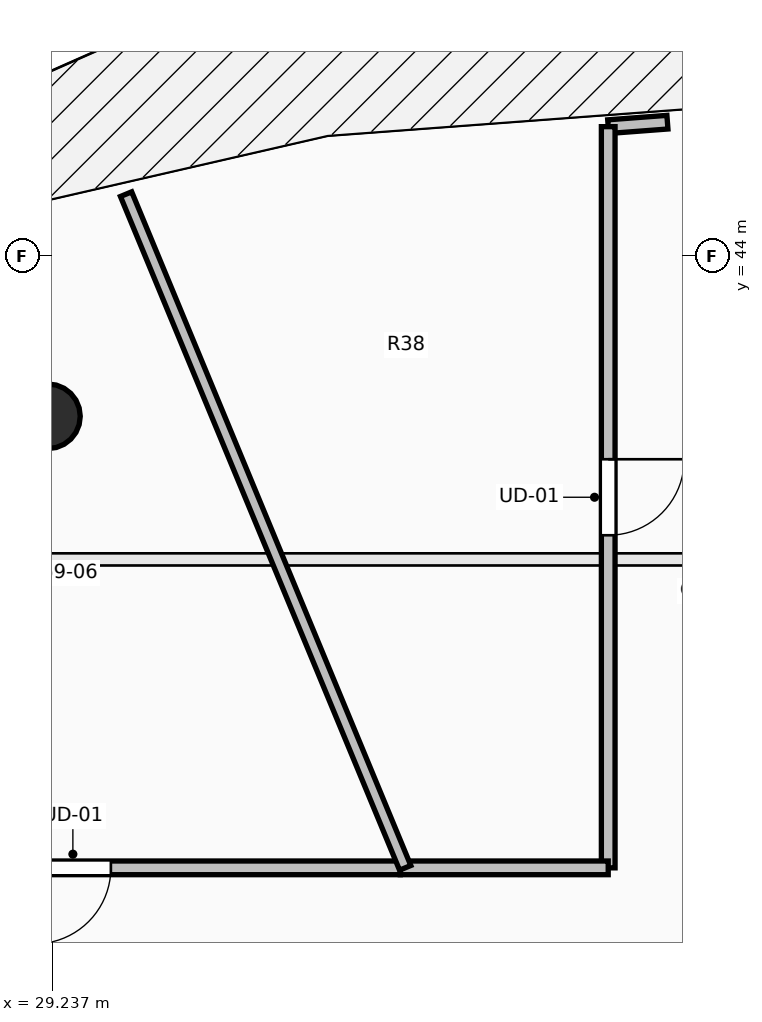
"""IFC4 building model, lengths in metres.
Left out: names, types, materials, properties, quantities, classifications, styles, units other than length and angle.
Written with IfcOpenShell. Run it as: python <this file> out.ifc"""

import sys

from ifc_helpers import new_model, si_unit, direction, frame, frame_2d, origin, origin_2d, place, context, subcontext, project, spatial, rectangle, circle, extrude, element, fill, save


model = new_model("IFC4")
c1 = context("Model", 3, precision=1e-05, world=origin(), true_north=direction((0.0, 1.0)))
c2 = subcontext(c1, "Body", "Model", "MODEL_VIEW")
j1 = project(units=[si_unit("LENGTHUNIT", "METRE"), si_unit("PLANEANGLEUNIT", "RADIAN")], contexts=[c1])
p1 = place(None, origin())
s1 = spatial("IfcSite", under=j1, at=p1, CompositionType="ELEMENT")
p2 = place(p1, origin())
s2 = spatial("IfcBuilding", under=s1, at=p2, CompositionType="ELEMENT")
p3 = place(p2, frame((0.0, 0.0, 255.55)))
s3 = spatial("IfcBuildingStorey", under=s2, at=p3, CompositionType="ELEMENT", Elevation=255.55)
p4 = place(p3, frame((29.179, 41.891, 0.0), z_axis=(0.0, 0.0, 1.0), x_axis=(-0.382683432365, 0.923879532511, 0.0)))
e1 = element("IfcColumn", 1, at=p4, inside=s3, PredefinedType="COLUMN", context=c2, shape_type="SweptSolid", body=[
    extrude(circle(Radius=0.425, at=origin_2d()), origin(), (0.0, 0.0, 1.0), 3.55),
])
p5 = place(p3, frame((37.329, 45.76, 0.0), z_axis=(0.0, 0.0, 1.0), x_axis=(-0.997136622012, -0.0756211415, 0.0)))
e2 = element("IfcWall", 2, at=p5, inside=s3, PredefinedType="PARTITIONING", context=c2, shape_type="SweptSolid", body=[
    extrude(rectangle(XDim=0.781, YDim=0.18, at=frame_2d((0.391, 0.0))), origin(), (0.0, 0.0, 1.0), 3.29),
])
p6 = place(p3, frame((36.55, 45.701, 0.0), z_axis=(0.0, 0.0, 1.0), x_axis=(0.0, -1.0, 0.0)))
e3 = element("IfcWall", 3, at=p6, inside=s3, PredefinedType="PARTITIONING", context=c2, shape_type="SweptSolid", body=[
    extrude(rectangle(XDim=9.751, YDim=0.18, at=frame_2d((4.875, 0.0))), origin(), (0.0, 0.0, 1.0), 2.482),
])
p7 = place(p6, frame((4.375, 0.0, 0.0)))
e4 = element("IfcOpeningElement", 4, at=p7, cuts=e3, PredefinedType="OPENING", context=c2, shape_type="SweptSolid", body=[
    extrude(rectangle(XDim=1.0, YDim=2.15, at=frame_2d((0.5, 1.075))), frame((0.0, 0.105, 0.0), z_axis=(0.0, -1.0, 0.0), x_axis=(1.0, 0.0, 0.0)), (0.0, 0.0, 1.0), 0.21),
])
p8 = place(p3, frame((36.55, 35.95, 0.0), z_axis=(0.0, 0.0, 1.0), x_axis=(-1.0, 0.0, 0.0)))
e5 = element("IfcWall", 5, at=p8, inside=s3, PredefinedType="PARTITIONING", context=c2, shape_type="SweptSolid", body=[
    extrude(rectangle(XDim=2.736, YDim=0.18, at=frame_2d((1.368, 0.0))), origin(), (0.0, 0.0, 1.0), 3.29),
])
p9 = place(p3, frame((33.814, 35.95, 0.0), z_axis=(0.0, 0.0, 1.0), x_axis=(-1.0, 0.0, 0.0)))
e6 = element("IfcWall", 6, at=p9, inside=s3, PredefinedType="PARTITIONING", context=c2, shape_type="SweptSolid", body=[
    extrude(rectangle(XDim=8.614, YDim=0.18, at=frame_2d((4.307, 0.0))), origin(), (0.0, 0.0, 1.0), 2.482),
])
p10 = place(p9, frame((3.807, 0.0, 0.0)))
e7 = element("IfcOpeningElement", 7, at=p10, cuts=e6, PredefinedType="OPENING", context=c2, shape_type="SweptSolid", body=[
    extrude(rectangle(XDim=1.0, YDim=2.15, at=frame_2d((0.5, 1.075))), frame((0.0, 0.105, 0.0), z_axis=(0.0, -1.0, 0.0), x_axis=(1.0, 0.0, 0.0)), (0.0, 0.0, 1.0), 0.21),
])
p11 = place(p3, frame((30.207, 44.813, 0.0), z_axis=(0.0, 0.0, 1.0), x_axis=(0.38274436158, -0.92385429245, 0.0)))
e8 = element("IfcWall", 8, at=p11, inside=s3, PredefinedType="PARTITIONING", context=c2, shape_type="SweptSolid", body=[
    extrude(rectangle(XDim=9.594, YDim=0.16, at=frame_2d((4.797, 0.0))), origin(), (0.0, 0.0, 1.0), 2.482),
])
p12 = place(p7, origin())
e9 = element("IfcDoor", 9, at=p12, inside=s3, OperationType="SINGLE_SWING_LEFT", PredefinedType="DOOR", context=c2, shape_type="SweptSolid", body=[
    extrude(rectangle(XDim=1.0, YDim=2.15, at=frame_2d((0.5, 1.075))), frame((0.0, 0.025, 0.0), z_axis=(0.0, -1.0, 0.0), x_axis=(1.0, 0.0, 0.0)), (0.0, 0.0, 1.0), 0.05),
])
fill(e4, e9)
p13 = place(p10, origin())
e10 = element("IfcDoor", 10, at=p13, inside=s3, OperationType="SINGLE_SWING_RIGHT", PredefinedType="DOOR", context=c2, shape_type="SweptSolid", body=[
    extrude(rectangle(XDim=1.0, YDim=2.15, at=frame_2d((0.5, 1.075))), frame((0.0, 0.025, 0.0), z_axis=(0.0, -1.0, 0.0), x_axis=(1.0, 0.0, 0.0)), (0.0, 0.0, 1.0), 0.05),
])
fill(e7, e10)
save(model, sys.argv[1])
